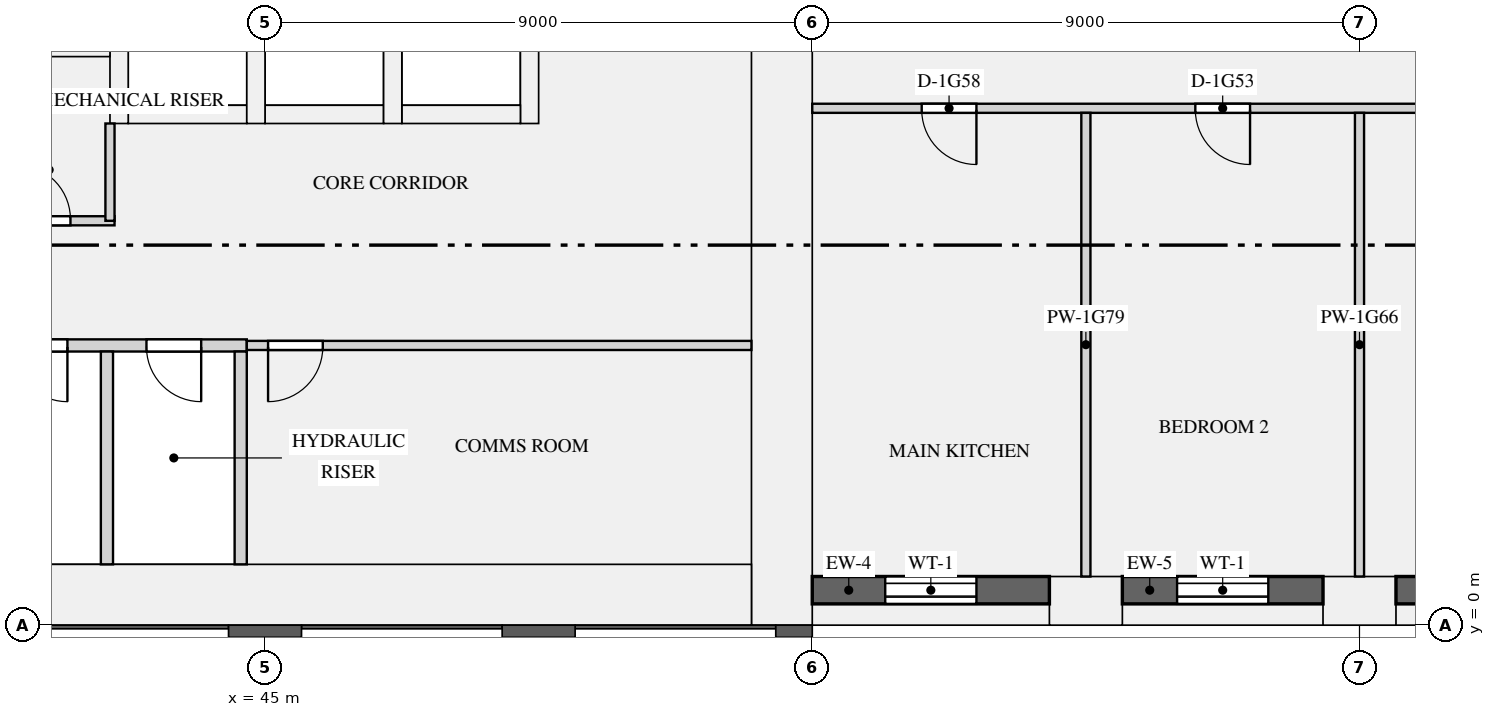
"""IFC4 building model, lengths in metres.
Left out: names, types, materials, properties, quantities, classifications, styles, units other than length and angle.
Written with IfcOpenShell. Run it as: python <this file> out.ifc"""

import sys

from ifc_helpers import new_model, si_unit, direction, frame, frame_2d, origin, origin_2d, place, context, subcontext, project, spatial, rectangle, extrude, element, fill, save


model = new_model("IFC4")
c1 = context("Model", 3, precision=1e-05, world=origin(), true_north=direction((0.0, 1.0)))
c2 = subcontext(c1, "Body", "Model", "MODEL_VIEW")
j1 = project(units=[si_unit("LENGTHUNIT", "METRE"), si_unit("PLANEANGLEUNIT", "RADIAN")], contexts=[c1])
p1 = place(None, origin())
s1 = spatial("IfcSite", under=j1, at=p1, CompositionType="ELEMENT")
p2 = place(p1, origin())
s2 = spatial("IfcBuilding", under=s1, at=p2, CompositionType="ELEMENT")
p3 = place(p2, frame((0.0, 0.0, 66.75)))
s3 = spatial("IfcBuildingStorey", under=s2, at=p3, CompositionType="ELEMENT", Elevation=66.75)
for number, where, z_axis, x_axis in (
    (1, (58.5, 0.4, 0.0), (0.0, 0.0, 1.0), (1.0, 0.0, 0.0)),
    (2, (63.0, 0.4, 0.0), (0.0, 0.0, 1.0), (1.0, 0.0, 0.0)),
):
    element("IfcColumn", number, at=place(p3, frame(where, z_axis=z_axis, x_axis=x_axis)), inside=s3, PredefinedType="USERDEFINED", context=c2, shape_type="SweptSolid", body=[
        extrude(rectangle(XDim=1.2, YDim=0.8, at=origin_2d()), origin(), (0.0, 0.0, 1.0), 3.15),
    ])
p4 = place(p3, frame((53.5, 0.0, 0.0), z_axis=(0.0, 0.0, 1.0), x_axis=(0.0, 1.0, 0.0)))
e3 = element("IfcWall", 3, at=p4, inside=s3, PredefinedType="SHEAR", context=c2, shape_type="SweptSolid", body=[
    extrude(rectangle(XDim=12.5, YDim=1.0, at=frame_2d((6.25, 0.0))), origin(), (0.0, 0.0, 1.0), 3.15),
])
p5 = place(p3, frame((19.0, 0.5, 0.0), z_axis=(0.0, 0.0, 1.0), x_axis=(1.0, 0.0, 0.0)))
e4 = element("IfcWall", 4, at=p5, inside=s3, PredefinedType="SHEAR", context=c2, shape_type="SweptSolid", body=[
    extrude(rectangle(XDim=34.0, YDim=1.0, at=frame_2d((17.0, 0.0))), origin(), (0.0, 0.0, 1.0), 3.15),
])
p6 = place(p3, frame((39.9, 9.5, 0.0), z_axis=(0.0, 0.0, 1.0), x_axis=(1.0, 0.0, 0.0)))
e5 = element("IfcWall", 5, at=p6, inside=s3, PredefinedType="SHEAR", context=c2, shape_type="SweptSolid", body=[
    extrude(rectangle(XDim=2.55, YDim=0.3, at=frame_2d((1.275, 0.0))), origin(), (0.0, 0.0, 1.0), 3.15),
])
p7 = place(p3, frame((42.75, 8.4, 0.0), z_axis=(0.0, 0.0, 1.0), x_axis=(1.0, 0.0, 0.0)))
e6 = element("IfcWall", 6, at=p7, inside=s3, PredefinedType="SHEAR", context=c2, shape_type="SweptSolid", body=[
    extrude(rectangle(XDim=1.95, YDim=0.3, at=frame_2d((0.975, 0.0))), origin(), (0.0, 0.0, 1.0), 3.15),
])
p8 = place(p3, frame((42.6, 8.25, 0.0), z_axis=(0.0, 0.0, 1.0), x_axis=(0.0, 1.0, 0.0)))
e7 = element("IfcWall", 7, at=p8, inside=s3, PredefinedType="SHEAR", context=c2, shape_type="SweptSolid", body=[
    extrude(rectangle(XDim=3.65, YDim=0.3, at=frame_2d((1.825, 0.0))), origin(), (0.0, 0.0, 1.0), 3.15),
])
p9 = place(p3, frame((45.0, 8.4, 0.0), z_axis=(0.0, 0.0, 1.0), x_axis=(1.0, 0.0, 0.0)))
e8 = element("IfcWall", 8, at=p9, inside=s3, PredefinedType="SHEAR", context=c2, shape_type="SweptSolid", body=[
    extrude(rectangle(XDim=1.95, YDim=0.3, at=frame_2d((0.975, 0.0))), origin(), (0.0, 0.0, 1.0), 3.15),
])
p10 = place(p3, frame((44.85, 8.25, 0.0), z_axis=(0.0, 0.0, 1.0), x_axis=(0.0, 1.0, 0.0)))
e9 = element("IfcWall", 9, at=p10, inside=s3, PredefinedType="SHEAR", context=c2, shape_type="SweptSolid", body=[
    extrude(rectangle(XDim=3.65, YDim=0.3, at=frame_2d((1.825, 0.0))), origin(), (0.0, 0.0, 1.0), 3.15),
])
p11 = place(p3, frame((47.25, 8.4, 0.0), z_axis=(0.0, 0.0, 1.0), x_axis=(1.0, 0.0, 0.0)))
e10 = element("IfcWall", 10, at=p11, inside=s3, PredefinedType="SHEAR", context=c2, shape_type="SweptSolid", body=[
    extrude(rectangle(XDim=1.95, YDim=0.3, at=frame_2d((0.975, 0.0))), origin(), (0.0, 0.0, 1.0), 3.15),
])
for number, where, z_axis, x_axis in (
    (11, (47.1, 8.25, 0.0), (0.0, 0.0, 1.0), (0.0, 1.0, 0.0)),
    (12, (49.35, 8.25, 0.0), (0.0, 0.0, 1.0), (0.0, 1.0, 0.0)),
):
    element("IfcWall", number, at=place(p3, frame(where, z_axis=z_axis, x_axis=x_axis)), inside=s3, PredefinedType="SHEAR", context=c2, shape_type="SweptSolid", body=[
        extrude(rectangle(XDim=3.65, YDim=0.3, at=frame_2d((1.825, 0.0))), origin(), (0.0, 0.0, 1.0), 3.15),
    ])
p12 = place(p3, frame((54.0, 0.575, 0.9), z_axis=(0.0, 0.0, 1.0), x_axis=(1.0, 0.0, 0.0)))
e13 = element("IfcWall", 13, at=p12, inside=s3, PredefinedType="SOLIDWALL", context=c2, shape_type="SweptSolid", body=[
    extrude(rectangle(XDim=3.9, YDim=0.45, at=frame_2d((1.95, 0.0))), origin(), (0.0, 0.0, 1.0), 1.93),
])
p13 = place(p12, frame((1.2, 0.0, 0.15)))
e14 = element("IfcOpeningElement", 14, at=p13, cuts=e13, PredefinedType="OPENING", context=c2, shape_type="SweptSolid", body=[
    extrude(rectangle(XDim=1.5, YDim=1.5, at=frame_2d((0.75, 0.75))), frame((0.0, 0.235, 0.0), z_axis=(0.0, -1.0, 0.0), x_axis=(1.0, 0.0, 0.0)), (0.0, 0.0, 1.0), 0.47),
])
p14 = place(p3, frame((59.1, 0.575, 0.9), z_axis=(0.0, 0.0, 1.0), x_axis=(1.0, 0.0, 0.0)))
e15 = element("IfcWall", 15, at=p14, inside=s3, PredefinedType="SOLIDWALL", context=c2, shape_type="SweptSolid", body=[
    extrude(rectangle(XDim=3.3, YDim=0.45, at=frame_2d((1.65, 0.0))), origin(), (0.0, 0.0, 1.0), 1.93),
])
p15 = place(p14, frame((0.9, 0.0, 0.15)))
e16 = element("IfcOpeningElement", 16, at=p15, cuts=e15, PredefinedType="OPENING", context=c2, shape_type="SweptSolid", body=[
    extrude(rectangle(XDim=1.5, YDim=1.5, at=frame_2d((0.75, 0.75))), frame((0.0, 0.235, 0.0), z_axis=(0.0, -1.0, 0.0), x_axis=(1.0, 0.0, 0.0)), (0.0, 0.0, 1.0), 0.47),
])
p16 = place(p3, frame((63.6, 0.575, 0.9), z_axis=(0.0, 0.0, 1.0), x_axis=(1.0, 0.0, 0.0)))
e17 = element("IfcWall", 17, at=p16, inside=s3, PredefinedType="SOLIDWALL", context=c2, shape_type="SweptSolid", body=[
    extrude(rectangle(XDim=3.3, YDim=0.45, at=frame_2d((1.65, 0.0))), origin(), (0.0, 0.0, 1.0), 1.93),
])
p17 = place(p16, frame((0.9, 0.0, 0.15)))
e18 = element("IfcOpeningElement", 18, at=p17, cuts=e17, PredefinedType="OPENING", context=c2, shape_type="SweptSolid", body=[
    extrude(rectangle(XDim=1.5, YDim=1.5, at=frame_2d((0.75, 0.75))), frame((0.0, 0.235, 0.0), z_axis=(0.0, -1.0, 0.0), x_axis=(1.0, 0.0, 0.0)), (0.0, 0.0, 1.0), 0.47),
])
p18 = place(p3, frame((40.2, 4.6, 0.0), z_axis=(0.0, 0.0, 1.0), x_axis=(1.0, 0.0, 0.0)))
e19 = element("IfcWall", 19, at=p18, inside=s3, PredefinedType="PARTITIONING", context=c2, shape_type="SweptSolid", body=[
    extrude(rectangle(XDim=4.5, YDim=0.2, at=frame_2d((2.25, 0.0))), origin(), (0.0, 0.0, 1.0), 2.83),
])
p19 = place(p18, frame((0.65, 0.0, 0.0)))
e20 = element("IfcOpeningElement", 20, at=p19, cuts=e19, PredefinedType="OPENING", context=c2, shape_type="SweptSolid", body=[
    extrude(rectangle(XDim=0.9, YDim=2.1, at=frame_2d((0.45, 1.05))), frame((0.0, 0.11, 0.0), z_axis=(0.0, -1.0, 0.0), x_axis=(1.0, 0.0, 0.0)), (0.0, 0.0, 1.0), 0.22),
])
p20 = place(p18, frame((2.85, 0.0, 0.0)))
e21 = element("IfcOpeningElement", 21, at=p20, cuts=e19, PredefinedType="OPENING", context=c2, shape_type="SweptSolid", body=[
    extrude(rectangle(XDim=0.9, YDim=2.1, at=frame_2d((0.45, 1.05))), frame((0.0, 0.11, 0.0), z_axis=(0.0, -1.0, 0.0), x_axis=(1.0, 0.0, 0.0)), (0.0, 0.0, 1.0), 0.22),
])
p21 = place(p3, frame((44.7, 4.6, 0.0), z_axis=(0.0, 0.0, 1.0), x_axis=(1.0, 0.0, 0.0)))
e22 = element("IfcWall", 22, at=p21, inside=s3, PredefinedType="PARTITIONING", context=c2, shape_type="SweptSolid", body=[
    extrude(rectangle(XDim=8.3, YDim=0.15, at=frame_2d((4.15, 0.0))), origin(), (0.0, 0.0, 1.0), 2.83),
])
p22 = place(p21, frame((0.35, 0.0, 0.0)))
e23 = element("IfcOpeningElement", 23, at=p22, cuts=e22, PredefinedType="OPENING", context=c2, shape_type="SweptSolid", body=[
    extrude(rectangle(XDim=0.9, YDim=2.1, at=frame_2d((0.45, 1.05))), frame((0.0, 0.085, 0.0), z_axis=(0.0, -1.0, 0.0), x_axis=(1.0, 0.0, 0.0)), (0.0, 0.0, 1.0), 0.17),
])
p23 = place(p3, frame((22.125, 6.65, 0.0), z_axis=(0.0, 0.0, 1.0), x_axis=(1.0, 0.0, 0.0)))
e24 = element("IfcWall", 24, at=p23, inside=s3, PredefinedType="PARTITIONING", context=c2, shape_type="SweptSolid", body=[
    extrude(rectangle(XDim=20.4, YDim=0.15, at=frame_2d((10.2, 0.0))), origin(), (0.0, 0.0, 1.0), 2.83),
])
p24 = place(p23, frame((0.525, 0.0, 0.0)))
e25 = element("IfcOpeningElement", 25, at=p24, cuts=e24, PredefinedType="OPENING", context=c2, shape_type="SweptSolid", body=[
    extrude(rectangle(XDim=0.9, YDim=2.1, at=frame_2d((0.45, 1.05))), frame((0.0, 0.085, 0.0), z_axis=(0.0, -1.0, 0.0), x_axis=(1.0, 0.0, 0.0)), (0.0, 0.0, 1.0), 0.17),
])
p25 = place(p23, frame((5.025, 0.0, 0.0)))
e26 = element("IfcOpeningElement", 26, at=p25, cuts=e24, PredefinedType="OPENING", context=c2, shape_type="SweptSolid", body=[
    extrude(rectangle(XDim=0.9, YDim=2.1, at=frame_2d((0.45, 1.05))), frame((0.0, 0.085, 0.0), z_axis=(0.0, -1.0, 0.0), x_axis=(1.0, 0.0, 0.0)), (0.0, 0.0, 1.0), 0.17),
])
p26 = place(p23, frame((10.525, 0.0, 0.0)))
e27 = element("IfcOpeningElement", 27, at=p26, cuts=e24, PredefinedType="OPENING", context=c2, shape_type="SweptSolid", body=[
    extrude(rectangle(XDim=0.9, YDim=2.1, at=frame_2d((0.45, 1.05))), frame((0.0, 0.085, 0.0), z_axis=(0.0, -1.0, 0.0), x_axis=(1.0, 0.0, 0.0)), (0.0, 0.0, 1.0), 0.17),
])
p27 = place(p23, frame((14.025, 0.0, 0.0)))
e28 = element("IfcOpeningElement", 28, at=p27, cuts=e24, PredefinedType="OPENING", context=c2, shape_type="SweptSolid", body=[
    extrude(rectangle(XDim=0.9, YDim=2.1, at=frame_2d((0.45, 1.05))), frame((0.0, 0.085, 0.0), z_axis=(0.0, -1.0, 0.0), x_axis=(1.0, 0.0, 0.0)), (0.0, 0.0, 1.0), 0.17),
])
p28 = place(p23, frame((18.775, 0.0, 0.0)))
e29 = element("IfcOpeningElement", 29, at=p28, cuts=e24, PredefinedType="OPENING", context=c2, shape_type="SweptSolid", body=[
    extrude(rectangle(XDim=0.9, YDim=2.1, at=frame_2d((0.45, 1.05))), frame((0.0, 0.085, 0.0), z_axis=(0.0, -1.0, 0.0), x_axis=(1.0, 0.0, 0.0)), (0.0, 0.0, 1.0), 0.17),
])
for number, where, z_axis, x_axis in (
    (30, (42.4, 1.0, 0.0), (0.0, 0.0, 1.0), (0.0, 1.0, 0.0)),
    (31, (44.6, 1.0, 0.0), (0.0, 0.0, 1.0), (0.0, 1.0, 0.0)),
):
    element("IfcWall", number, at=place(p3, frame(where, z_axis=z_axis, x_axis=x_axis)), inside=s3, PredefinedType="PARTITIONING", context=c2, shape_type="SweptSolid", body=[
        extrude(rectangle(XDim=3.5, YDim=0.2, at=frame_2d((1.75, 0.0))), origin(), (0.0, 0.0, 1.0), 2.83),
    ])
p29 = place(p3, frame((42.45, 6.65, 0.0), z_axis=(0.0, 0.0, 1.0), x_axis=(0.0, 1.0, 0.0)))
e32 = element("IfcWall", 32, at=p29, inside=s3, PredefinedType="PARTITIONING", context=c2, shape_type="SweptSolid", body=[
    extrude(rectangle(XDim=1.6, YDim=0.15, at=frame_2d((0.8, 0.0))), origin(), (0.0, 0.0, 1.0), 2.83),
])
p30 = place(p3, frame((54.0, 8.5, 0.0), z_axis=(0.0, 0.0, 1.0), x_axis=(1.0, 0.0, 0.0)))
e33 = element("IfcWall", 33, at=p30, inside=s3, PredefinedType="PARTITIONING", context=c2, shape_type="SweptSolid", body=[
    extrude(rectangle(XDim=21.7, YDim=0.15, at=frame_2d((10.85, 0.0))), origin(), (0.0, 0.0, 1.0), 2.83),
])
p31 = place(p30, frame((6.3, 0.0, 0.0)))
e34 = element("IfcOpeningElement", 34, at=p31, cuts=e33, PredefinedType="OPENING", context=c2, shape_type="SweptSolid", body=[
    extrude(rectangle(XDim=0.9, YDim=2.1, at=frame_2d((0.45, 1.05))), frame((0.0, 0.085, 0.0), z_axis=(0.0, -1.0, 0.0), x_axis=(1.0, 0.0, 0.0)), (0.0, 0.0, 1.0), 0.17),
])
p32 = place(p30, frame((1.8, 0.0, 0.0)))
e35 = element("IfcOpeningElement", 35, at=p32, cuts=e33, PredefinedType="OPENING", context=c2, shape_type="SweptSolid", body=[
    extrude(rectangle(XDim=0.9, YDim=2.1, at=frame_2d((0.45, 1.05))), frame((0.0, 0.085, 0.0), z_axis=(0.0, -1.0, 0.0), x_axis=(1.0, 0.0, 0.0)), (0.0, 0.0, 1.0), 0.17),
])
p33 = place(p30, frame((10.8, 0.0, 0.0)))
e36 = element("IfcOpeningElement", 36, at=p33, cuts=e33, PredefinedType="OPENING", context=c2, shape_type="SweptSolid", body=[
    extrude(rectangle(XDim=0.9, YDim=2.1, at=frame_2d((0.45, 1.05))), frame((0.0, 0.085, 0.0), z_axis=(0.0, -1.0, 0.0), x_axis=(1.0, 0.0, 0.0)), (0.0, 0.0, 1.0), 0.17),
])
p34 = place(p30, frame((19.175, 0.0, 0.0)))
e37 = element("IfcOpeningElement", 37, at=p34, cuts=e33, PredefinedType="OPENING", context=c2, shape_type="SweptSolid", body=[
    extrude(rectangle(XDim=1.5, YDim=2.1, at=frame_2d((0.75, 1.05))), frame((0.0, 0.085, 0.0), z_axis=(0.0, -1.0, 0.0), x_axis=(1.0, 0.0, 0.0)), (0.0, 0.0, 1.0), 0.17),
])
for number, where, z_axis, x_axis in (
    (38, (63.0, 0.8, 0.0), (0.0, 0.0, 1.0), (0.0, 1.0, 0.0)),
    (39, (58.5, 0.8, 0.0), (0.0, 0.0, 1.0), (0.0, 1.0, 0.0)),
):
    element("IfcWall", number, at=place(p3, frame(where, z_axis=z_axis, x_axis=x_axis)), inside=s3, PredefinedType="PARTITIONING", context=c2, shape_type="SweptSolid", body=[
        extrude(rectangle(XDim=7.625, YDim=0.15, at=frame_2d((3.812, 0.0))), origin(), (0.0, 0.0, 1.0), 2.83),
    ])
p35 = place(p13, origin())
e40 = element("IfcWindow", 40, at=p35, inside=s3, PartitioningType="SINGLE_PANEL", PredefinedType="WINDOW", context=c2, shape_type="SweptSolid", body=[
    extrude(rectangle(XDim=1.5, YDim=1.5, at=frame_2d((0.75, 0.75))), frame((0.0, -0.065, 0.0), z_axis=(0.0, -1.0, 0.0), x_axis=(1.0, 0.0, 0.0)), (0.0, 0.0, 1.0), 0.06),
])
fill(e14, e40)
p36 = place(p15, origin())
e41 = element("IfcWindow", 41, at=p36, inside=s3, PartitioningType="SINGLE_PANEL", PredefinedType="WINDOW", context=c2, shape_type="SweptSolid", body=[
    extrude(rectangle(XDim=1.5, YDim=1.5, at=frame_2d((0.75, 0.75))), frame((0.0, -0.065, 0.0), z_axis=(0.0, -1.0, 0.0), x_axis=(1.0, 0.0, 0.0)), (0.0, 0.0, 1.0), 0.06),
])
fill(e16, e41)
p37 = place(p28, origin())
e42 = element("IfcDoor", 42, at=p37, inside=s3, OperationType="SINGLE_SWING_LEFT", PredefinedType="DOOR", context=c2, shape_type="SweptSolid", body=[
    extrude(rectangle(XDim=0.9, YDim=2.1, at=frame_2d((0.45, 1.05))), frame((0.0, 0.025, 0.0), z_axis=(0.0, -1.0, 0.0), x_axis=(1.0, 0.0, 0.0)), (0.0, 0.0, 1.0), 0.05),
])
fill(e29, e42)
p38 = place(p22, frame((0.9, 0.0, 0.0), z_axis=(0.0, 0.0, 1.0), x_axis=(-1.0, 0.0, 0.0)))
e43 = element("IfcDoor", 43, at=p38, inside=s3, OperationType="SINGLE_SWING_RIGHT", PredefinedType="DOOR", context=c2, shape_type="SweptSolid", body=[
    extrude(rectangle(XDim=0.9, YDim=2.1, at=frame_2d((0.45, 1.05))), frame((0.0, 0.025, 0.0), z_axis=(0.0, -1.0, 0.0), x_axis=(1.0, 0.0, 0.0)), (0.0, 0.0, 1.0), 0.05),
])
fill(e23, e43)
p39 = place(p19, frame((0.9, 0.0, 0.0), z_axis=(0.0, 0.0, 1.0), x_axis=(-1.0, 0.0, 0.0)))
e44 = element("IfcDoor", 44, at=p39, inside=s3, OperationType="SINGLE_SWING_LEFT", PredefinedType="DOOR", context=c2, shape_type="SweptSolid", body=[
    extrude(rectangle(XDim=0.9, YDim=2.1, at=frame_2d((0.45, 1.05))), frame((0.0, 0.025, 0.0), z_axis=(0.0, -1.0, 0.0), x_axis=(1.0, 0.0, 0.0)), (0.0, 0.0, 1.0), 0.05),
])
fill(e20, e44)
p40 = place(p20, frame((0.9, 0.0, 0.0), z_axis=(0.0, 0.0, 1.0), x_axis=(-1.0, 0.0, 0.0)))
e45 = element("IfcDoor", 45, at=p40, inside=s3, OperationType="SINGLE_SWING_LEFT", PredefinedType="DOOR", context=c2, shape_type="SweptSolid", body=[
    extrude(rectangle(XDim=0.9, YDim=2.1, at=frame_2d((0.45, 1.05))), frame((0.0, 0.025, 0.0), z_axis=(0.0, -1.0, 0.0), x_axis=(1.0, 0.0, 0.0)), (0.0, 0.0, 1.0), 0.05),
])
fill(e21, e45)
p41 = place(p31, frame((0.9, 0.0, 0.0), z_axis=(0.0, 0.0, 1.0), x_axis=(-1.0, 0.0, 0.0)))
e46 = element("IfcDoor", 46, at=p41, inside=s3, OperationType="SINGLE_SWING_LEFT", PredefinedType="DOOR", context=c2, shape_type="SweptSolid", body=[
    extrude(rectangle(XDim=0.9, YDim=2.1, at=frame_2d((0.45, 1.05))), frame((0.0, 0.025, 0.0), z_axis=(0.0, -1.0, 0.0), x_axis=(1.0, 0.0, 0.0)), (0.0, 0.0, 1.0), 0.05),
])
fill(e34, e46)
p42 = place(p32, frame((0.9, 0.0, 0.0), z_axis=(0.0, 0.0, 1.0), x_axis=(-1.0, 0.0, 0.0)))
e47 = element("IfcDoor", 47, at=p42, inside=s3, OperationType="SINGLE_SWING_LEFT", PredefinedType="DOOR", context=c2, shape_type="SweptSolid", body=[
    extrude(rectangle(XDim=0.9, YDim=2.1, at=frame_2d((0.45, 1.05))), frame((0.0, 0.025, 0.0), z_axis=(0.0, -1.0, 0.0), x_axis=(1.0, 0.0, 0.0)), (0.0, 0.0, 1.0), 0.05),
])
fill(e35, e47)
save(model, sys.argv[1])
